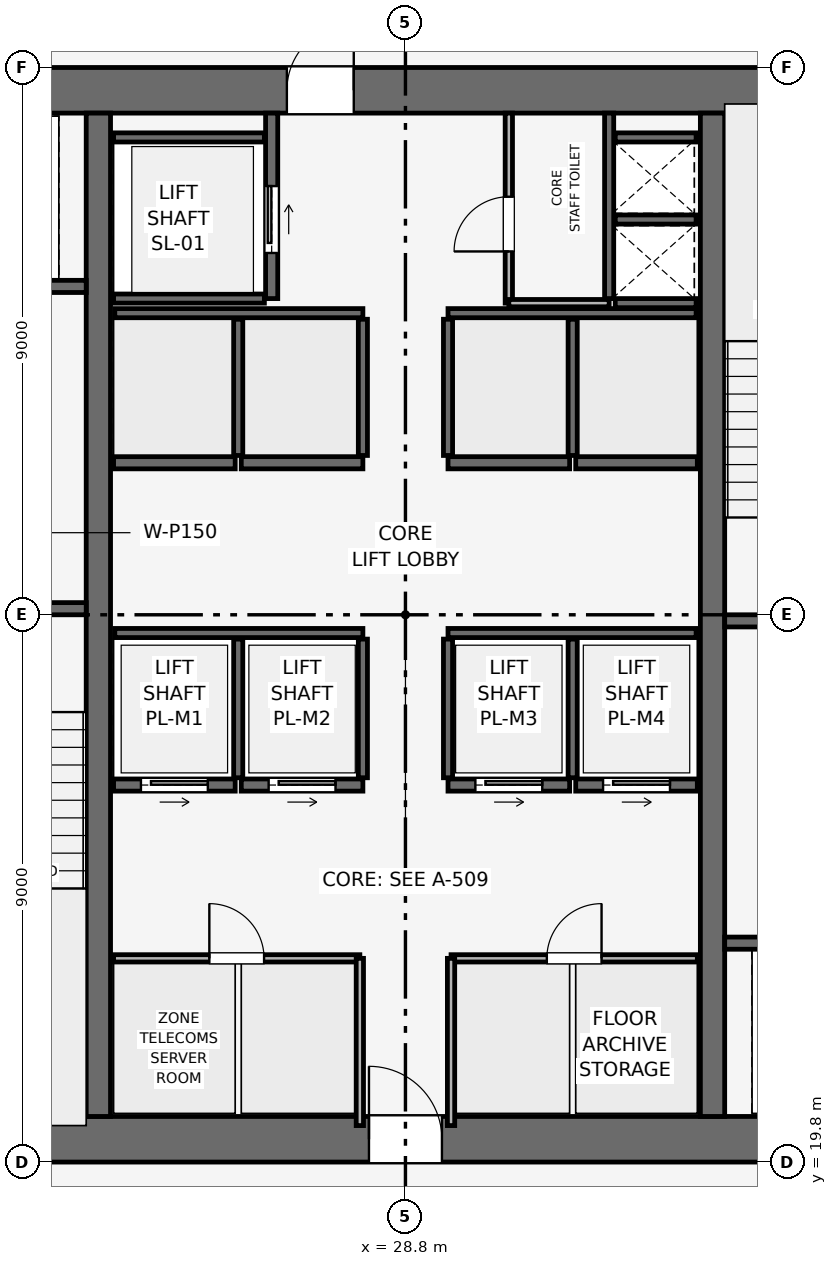
"""IFC4 building model, lengths in metres.
Left out: names, types, materials, properties, quantities, classifications, styles, units other than length and angle.
Written with IfcOpenShell. Run it as: python <this file> out.ifc"""

import sys

from ifc_helpers import new_model, si_unit, direction, frame, frame_2d, origin, place, context, subcontext, project, spatial, rectangle, extrude, element, fill, save


model = new_model("IFC4")
c1 = context("Model", 3, precision=1e-05, world=origin(), true_north=direction((0.0, 1.0)))
c2 = subcontext(c1, "Body", "Model", "MODEL_VIEW")
j1 = project(units=[si_unit("LENGTHUNIT", "METRE"), si_unit("PLANEANGLEUNIT", "RADIAN")], contexts=[c1])
p1 = place(None, origin())
s1 = spatial("IfcSite", under=j1, at=p1, CompositionType="ELEMENT")
p2 = place(p1, origin())
s2 = spatial("IfcBuilding", under=s1, at=p2, CompositionType="ELEMENT")
p3 = place(p2, frame((0.0, 0.0, 229.95)))
s3 = spatial("IfcBuildingStorey", under=s2, at=p3, CompositionType="ELEMENT", Elevation=229.95)
p4 = place(p3, frame((19.8, 20.175, 0.0), z_axis=(0.0, 0.0, 1.0), x_axis=(1.0, 0.0, 0.0)))
e1 = element("IfcWall", 1, at=p4, inside=s3, PredefinedType="SHEAR", context=c2, shape_type="SweptSolid", body=[
    extrude(rectangle(XDim=18.0, YDim=0.75, at=frame_2d((9.0, 0.0))), origin(), (0.0, 0.0, 1.0), 3.75),
])
p5 = place(p4, frame((8.4, 0.0, 0.0)))
e2 = element("IfcOpeningElement", 2, at=p5, cuts=e1, PredefinedType="OPENING", context=c2, shape_type="SweptSolid", body=[
    extrude(rectangle(XDim=1.2, YDim=2.2, at=frame_2d((0.6, 1.1))), frame((0.0, 0.385, 0.0), z_axis=(0.0, -1.0, 0.0), x_axis=(1.0, 0.0, 0.0)), (0.0, 0.0, 1.0), 0.77),
])
p6 = place(p3, frame((19.8, 37.425, 0.0), z_axis=(0.0, 0.0, 1.0), x_axis=(1.0, 0.0, 0.0)))
e3 = element("IfcWall", 3, at=p6, inside=s3, PredefinedType="SHEAR", context=c2, shape_type="SweptSolid", body=[
    extrude(rectangle(XDim=18.0, YDim=0.75, at=frame_2d((9.0, 0.0))), origin(), (0.0, 0.0, 1.0), 3.75),
])
p7 = place(p6, frame((7.05, 0.0, 0.0)))
e4 = element("IfcOpeningElement", 4, at=p7, cuts=e3, PredefinedType="OPENING", context=c2, shape_type="SweptSolid", body=[
    extrude(rectangle(XDim=1.1, YDim=2.15, at=frame_2d((0.55, 1.075))), frame((0.0, 0.385, 0.0), z_axis=(0.0, -1.0, 0.0), x_axis=(1.0, 0.0, 0.0)), (0.0, 0.0, 1.0), 0.77),
])
for number, where, z_axis, x_axis in (
    (5, (23.75, 20.55, 0.0), (0.0, 0.0, 1.0), (0.0, 1.0, 0.0)),
    (6, (33.85, 20.55, 0.0), (0.0, 0.0, 1.0), (0.0, 1.0, 0.0)),
):
    element("IfcWall", number, at=place(p3, frame(where, z_axis=z_axis, x_axis=x_axis)), inside=s3, PredefinedType="SHEAR", context=c2, shape_type="SweptSolid", body=[
        extrude(rectangle(XDim=16.5, YDim=0.4, at=frame_2d((8.25, 0.0))), origin(), (0.0, 0.0, 1.0), 3.75),
    ])
p8 = place(p3, frame((20.4, 28.9, 0.0), z_axis=(0.0, 0.0, 1.0), x_axis=(1.0, 0.0, 0.0)))
e7 = element("IfcWall", 7, at=p8, inside=s3, PredefinedType="SHEAR", context=c2, shape_type="SweptSolid", body=[
    extrude(rectangle(XDim=3.15, YDim=0.2, at=frame_2d((1.575, 0.0))), origin(), (0.0, 0.0, 1.0), 3.5),
])
p9 = place(p8, frame((0.8, 0.0, 0.0)))
e8 = element("IfcOpeningElement", 8, at=p9, cuts=e7, PredefinedType="OPENING", context=c2, shape_type="SweptSolid", body=[
    extrude(rectangle(XDim=1.0, YDim=2.1, at=frame_2d((0.5, 1.05))), frame((0.0, 0.11, 0.0), z_axis=(0.0, -1.0, 0.0), x_axis=(1.0, 0.0, 0.0)), (0.0, 0.0, 1.0), 0.22),
])
p10 = place(p3, frame((34.05, 28.7, 0.0), z_axis=(0.0, 0.0, 1.0), x_axis=(1.0, 0.0, 0.0)))
e9 = element("IfcWall", 9, at=p10, inside=s3, PredefinedType="SHEAR", context=c2, shape_type="SweptSolid", body=[
    extrude(rectangle(XDim=3.15, YDim=0.2, at=frame_2d((1.575, 0.0))), origin(), (0.0, 0.0, 1.0), 3.5),
])
p11 = place(p10, frame((0.8, 0.0, 0.0)))
e10 = element("IfcOpeningElement", 10, at=p11, cuts=e9, PredefinedType="OPENING", context=c2, shape_type="SweptSolid", body=[
    extrude(rectangle(XDim=1.0, YDim=2.1, at=frame_2d((0.5, 1.05))), frame((0.0, 0.11, 0.0), z_axis=(0.0, -1.0, 0.0), x_axis=(1.0, 0.0, 0.0)), (0.0, 0.0, 1.0), 0.22),
])
p12 = place(p3, frame((32.15, 34.0, 0.0), z_axis=(0.0, 0.0, 1.0), x_axis=(0.0, 1.0, 0.0)))
e11 = element("IfcWall", 11, at=p12, inside=s3, PredefinedType="SHEAR", context=c2, shape_type="SweptSolid", body=[
    extrude(rectangle(XDim=3.05, YDim=0.15, at=frame_2d((1.525, 0.0))), origin(), (0.0, 0.0, 1.0), 3.5),
])
for number, where, z_axis, x_axis in (
    (12, (32.25, 33.925, 0.0), (0.0, 0.0, 1.0), (1.0, 0.0, 0.0)),
    (13, (32.25, 35.3, 0.0), (0.0, 0.0, 1.0), (1.0, 0.0, 0.0)),
):
    element("IfcWall", number, at=place(p3, frame(where, z_axis=z_axis, x_axis=x_axis)), inside=s3, PredefinedType="SHEAR", context=c2, shape_type="SweptSolid", body=[
        extrude(rectangle(XDim=1.33, YDim=0.15, at=frame_2d((0.665, 0.0))), origin(), (0.0, 0.0, 1.0), 3.5),
    ])
p13 = place(p3, frame((20.5, 34.2, 0.0), z_axis=(0.0, 0.0, 1.0), x_axis=(1.0, 0.0, 0.0)))
e14 = element("IfcWall", 14, at=p13, inside=s3, PredefinedType="SHEAR", context=c2, shape_type="SweptSolid", body=[
    extrude(rectangle(XDim=3.05, YDim=0.2, at=frame_2d((1.525, 0.0))), origin(), (0.0, 0.0, 1.0), 3.5),
])
p14 = place(p13, frame((0.75, 0.0, 0.0)))
e15 = element("IfcOpeningElement", 15, at=p14, cuts=e14, PredefinedType="OPENING", context=c2, shape_type="SweptSolid", body=[
    extrude(rectangle(XDim=1.1, YDim=2.15, at=frame_2d((0.55, 1.075))), frame((0.0, 0.11, 0.0), z_axis=(0.0, -1.0, 0.0), x_axis=(1.0, 0.0, 0.0)), (0.0, 0.0, 1.0), 0.22),
])
p15 = place(p3, frame((34.05, 23.4, 0.0), z_axis=(0.0, 0.0, 1.0), x_axis=(1.0, 0.0, 0.0)))
e16 = element("IfcWall", 16, at=p15, inside=s3, PredefinedType="SHEAR", context=c2, shape_type="SweptSolid", body=[
    extrude(rectangle(XDim=3.05, YDim=0.2, at=frame_2d((1.525, 0.0))), origin(), (0.0, 0.0, 1.0), 3.5),
])
p16 = place(p15, frame((1.2, 0.0, 0.0)))
e17 = element("IfcOpeningElement", 17, at=p16, cuts=e16, PredefinedType="OPENING", context=c2, shape_type="SweptSolid", body=[
    extrude(rectangle(XDim=1.1, YDim=2.15, at=frame_2d((0.55, 1.075))), frame((0.0, 0.11, 0.0), z_axis=(0.0, -1.0, 0.0), x_axis=(1.0, 0.0, 0.0)), (0.0, 0.0, 1.0), 0.22),
])
p17 = place(p3, frame((26.6, 34.0, 0.0), z_axis=(0.0, 0.0, 1.0), x_axis=(0.0, 1.0, 0.0)))
e18 = element("IfcWall", 18, at=p17, inside=s3, PredefinedType="SHEAR", context=c2, shape_type="SweptSolid", body=[
    extrude(rectangle(XDim=3.05, YDim=0.2, at=frame_2d((1.525, 0.0))), origin(), (0.0, 0.0, 1.0), 3.5),
])
p18 = place(p17, frame((0.75, 0.0, 0.0)))
e19 = element("IfcOpeningElement", 19, at=p18, cuts=e18, PredefinedType="OPENING", context=c2, shape_type="SweptSolid", body=[
    extrude(rectangle(XDim=1.1, YDim=2.15, at=frame_2d((0.55, 1.075))), frame((0.0, 0.11, 0.0), z_axis=(0.0, -1.0, 0.0), x_axis=(1.0, 0.0, 0.0)), (0.0, 0.0, 1.0), 0.22),
])
for number, where, z_axis, x_axis in (
    (20, (24.0, 34.0, 0.0), (0.0, 0.0, 1.0), (1.0, 0.0, 0.0)),
    (21, (24.0, 36.65, 0.0), (0.0, 0.0, 1.0), (1.0, 0.0, 0.0)),
):
    element("IfcWall", number, at=place(p3, frame(where, z_axis=z_axis, x_axis=x_axis)), inside=s3, PredefinedType="SHEAR", context=c2, shape_type="SweptSolid", body=[
        extrude(rectangle(XDim=2.48, YDim=0.15, at=frame_2d((1.24, 0.0))), origin(), (0.0, 0.0, 1.0), 3.5),
    ])
p19 = place(p3, frame((24.0, 26.0, 0.0), z_axis=(0.0, 0.0, 1.0), x_axis=(1.0, 0.0, 0.0)))
e22 = element("IfcWall", 22, at=p19, inside=s3, PredefinedType="SHEAR", context=c2, shape_type="SweptSolid", body=[
    extrude(rectangle(XDim=2.0, YDim=0.2, at=frame_2d((1.0, 0.0))), origin(), (0.0, 0.0, 1.0), 3.5),
])
p20 = place(p19, frame((0.45, 0.0, 0.0)))
e23 = element("IfcOpeningElement", 23, at=p20, cuts=e22, PredefinedType="OPENING", context=c2, shape_type="SweptSolid", body=[
    extrude(rectangle(XDim=1.1, YDim=2.15, at=frame_2d((0.55, 1.075))), frame((0.0, 0.11, 0.0), z_axis=(0.0, -1.0, 0.0), x_axis=(1.0, 0.0, 0.0)), (0.0, 0.0, 1.0), 0.22),
])
p21 = place(p3, frame((26.1, 26.0, 0.0), z_axis=(0.0, 0.0, 1.0), x_axis=(1.0, 0.0, 0.0)))
e24 = element("IfcWall", 24, at=p21, inside=s3, PredefinedType="SHEAR", context=c2, shape_type="SweptSolid", body=[
    extrude(rectangle(XDim=2.0, YDim=0.2, at=frame_2d((1.0, 0.0))), origin(), (0.0, 0.0, 1.0), 3.5),
])
p22 = place(p21, frame((0.45, 0.0, 0.0)))
e25 = element("IfcOpeningElement", 25, at=p22, cuts=e24, PredefinedType="OPENING", context=c2, shape_type="SweptSolid", body=[
    extrude(rectangle(XDim=1.1, YDim=2.15, at=frame_2d((0.55, 1.075))), frame((0.0, 0.11, 0.0), z_axis=(0.0, -1.0, 0.0), x_axis=(1.0, 0.0, 0.0)), (0.0, 0.0, 1.0), 0.22),
])
p23 = place(p3, frame((29.5, 26.0, 0.0), z_axis=(0.0, 0.0, 1.0), x_axis=(1.0, 0.0, 0.0)))
e26 = element("IfcWall", 26, at=p23, inside=s3, PredefinedType="SHEAR", context=c2, shape_type="SweptSolid", body=[
    extrude(rectangle(XDim=2.0, YDim=0.2, at=frame_2d((1.0, 0.0))), origin(), (0.0, 0.0, 1.0), 3.5),
])
p24 = place(p23, frame((0.45, 0.0, 0.0)))
e27 = element("IfcOpeningElement", 27, at=p24, cuts=e26, PredefinedType="OPENING", context=c2, shape_type="SweptSolid", body=[
    extrude(rectangle(XDim=1.1, YDim=2.15, at=frame_2d((0.55, 1.075))), frame((0.0, 0.11, 0.0), z_axis=(0.0, -1.0, 0.0), x_axis=(1.0, 0.0, 0.0)), (0.0, 0.0, 1.0), 0.22),
])
p25 = place(p3, frame((31.6, 26.0, 0.0), z_axis=(0.0, 0.0, 1.0), x_axis=(1.0, 0.0, 0.0)))
e28 = element("IfcWall", 28, at=p25, inside=s3, PredefinedType="SHEAR", context=c2, shape_type="SweptSolid", body=[
    extrude(rectangle(XDim=2.0, YDim=0.2, at=frame_2d((1.0, 0.0))), origin(), (0.0, 0.0, 1.0), 3.5),
])
p26 = place(p25, frame((0.45, 0.0, 0.0)))
e29 = element("IfcOpeningElement", 29, at=p26, cuts=e28, PredefinedType="OPENING", context=c2, shape_type="SweptSolid", body=[
    extrude(rectangle(XDim=1.1, YDim=2.15, at=frame_2d((0.55, 1.075))), frame((0.0, 0.11, 0.0), z_axis=(0.0, -1.0, 0.0), x_axis=(1.0, 0.0, 0.0)), (0.0, 0.0, 1.0), 0.22),
])
for number, where, z_axis, x_axis in (
    (30, (24.0, 31.3, 0.0), (0.0, 0.0, 1.0), (1.0, 0.0, 0.0)),
    (31, (26.1, 31.3, 0.0), (0.0, 0.0, 1.0), (1.0, 0.0, 0.0)),
    (32, (29.5, 31.3, 0.0), (0.0, 0.0, 1.0), (1.0, 0.0, 0.0)),
    (33, (31.6, 31.3, 0.0), (0.0, 0.0, 1.0), (1.0, 0.0, 0.0)),
):
    element("IfcWall", number, at=place(p3, frame(where, z_axis=z_axis, x_axis=x_axis)), inside=s3, PredefinedType="SHEAR", context=c2, shape_type="SweptSolid", body=[
        extrude(rectangle(XDim=2.0, YDim=0.2, at=frame_2d((1.0, 0.0))), origin(), (0.0, 0.0, 1.0), 3.5),
    ])
p27 = place(p3, frame((32.25, 36.65, 0.0), z_axis=(0.0, 0.0, 1.0), x_axis=(1.0, 0.0, 0.0)))
e34 = element("IfcWall", 34, at=p27, inside=s3, PredefinedType="SHEAR", context=c2, shape_type="SweptSolid", body=[
    extrude(rectangle(XDim=1.33, YDim=0.15, at=frame_2d((0.665, 0.0))), origin(), (0.0, 0.0, 1.0), 3.5),
])
for number, where, z_axis, x_axis in (
    (35, (24.02, 28.5, 0.0), (0.0, 0.0, 1.0), (1.0, 0.0, 0.0)),
    (36, (29.5, 28.5, 0.0), (0.0, 0.0, 1.0), (1.0, 0.0, 0.0)),
):
    element("IfcWall", number, at=place(p3, frame(where, z_axis=z_axis, x_axis=x_axis)), inside=s3, PredefinedType="SHEAR", context=c2, shape_type="SweptSolid", body=[
        extrude(rectangle(XDim=4.08, YDim=0.15, at=frame_2d((2.04, 0.0))), origin(), (0.0, 0.0, 1.0), 3.5),
    ])
for number, where, z_axis, x_axis in (
    (37, (26.05, 26.12, 0.0), (0.0, 0.0, 1.0), (0.0, 1.0, 0.0)),
    (38, (28.1, 26.12, 0.0), (0.0, 0.0, 1.0), (0.0, 1.0, 0.0)),
    (39, (29.5, 26.12, 0.0), (0.0, 0.0, 1.0), (0.0, 1.0, 0.0)),
    (40, (31.55, 26.12, 0.0), (0.0, 0.0, 1.0), (0.0, 1.0, 0.0)),
):
    element("IfcWall", number, at=place(p3, frame(where, z_axis=z_axis, x_axis=x_axis)), inside=s3, PredefinedType="SHEAR", context=c2, shape_type="SweptSolid", body=[
        extrude(rectangle(XDim=2.28, YDim=0.15, at=frame_2d((1.14, 0.0))), origin(), (0.0, 0.0, 1.0), 3.5),
    ])
for number, where, z_axis, x_axis in (
    (41, (24.02, 33.76, 0.0), (0.0, 0.0, 1.0), (1.0, 0.0, 0.0)),
    (42, (29.5, 33.76, 0.0), (0.0, 0.0, 1.0), (1.0, 0.0, 0.0)),
):
    element("IfcWall", number, at=place(p3, frame(where, z_axis=z_axis, x_axis=x_axis)), inside=s3, PredefinedType="SHEAR", context=c2, shape_type="SweptSolid", body=[
        extrude(rectangle(XDim=4.08, YDim=0.15, at=frame_2d((2.04, 0.0))), origin(), (0.0, 0.0, 1.0), 3.5),
    ])
for number, where, z_axis, x_axis in (
    (43, (26.05, 31.42, 0.0), (0.0, 0.0, 1.0), (0.0, 1.0, 0.0)),
    (44, (28.1, 31.42, 0.0), (0.0, 0.0, 1.0), (0.0, 1.0, 0.0)),
    (45, (29.5, 31.42, 0.0), (0.0, 0.0, 1.0), (0.0, 1.0, 0.0)),
    (46, (31.55, 31.42, 0.0), (0.0, 0.0, 1.0), (0.0, 1.0, 0.0)),
):
    element("IfcWall", number, at=place(p3, frame(where, z_axis=z_axis, x_axis=x_axis)), inside=s3, PredefinedType="SHEAR", context=c2, shape_type="SweptSolid", body=[
        extrude(rectangle(XDim=2.24, YDim=0.15, at=frame_2d((1.12, 0.0))), origin(), (0.0, 0.0, 1.0), 3.5),
    ])
p28 = place(p3, frame((30.5, 33.925, 0.0), z_axis=(0.0, 0.0, 1.0), x_axis=(0.0, 1.0, 0.0)))
e47 = element("IfcWall", 47, at=p28, inside=s3, PredefinedType="PARTITIONING", context=c2, shape_type="SweptSolid", body=[
    extrude(rectangle(XDim=3.125, YDim=0.12, at=frame_2d((1.562, 0.0))), origin(), (0.0, 0.0, 1.0), 3.5),
])
p29 = place(p28, frame((0.85, 0.0, 0.0)))
e48 = element("IfcOpeningElement", 48, at=p29, cuts=e47, PredefinedType="OPENING", context=c2, shape_type="SweptSolid", body=[
    extrude(rectangle(XDim=0.9, YDim=2.1, at=frame_2d((0.45, 1.05))), frame((0.0, 0.07, 0.0), z_axis=(0.0, -1.0, 0.0), x_axis=(1.0, 0.0, 0.0)), (0.0, 0.0, 1.0), 0.14),
])
p30 = place(p3, frame((30.5, 33.925, 0.0), z_axis=(0.0, 0.0, 1.0), x_axis=(1.0, 0.0, 0.0)))
e49 = element("IfcWall", 49, at=p30, inside=s3, PredefinedType="PARTITIONING", context=c2, shape_type="SweptSolid", body=[
    extrude(rectangle(XDim=1.65, YDim=0.12, at=frame_2d((0.825, 0.0))), origin(), (0.0, 0.0, 1.0), 3.5),
])
p31 = place(p3, frame((24.0, 23.15, 0.0), z_axis=(0.0, 0.0, 1.0), x_axis=(1.0, 0.0, 0.0)))
e50 = element("IfcWall", 50, at=p31, inside=s3, PredefinedType="PARTITIONING", context=c2, shape_type="SweptSolid", body=[
    extrude(rectangle(XDim=4.05, YDim=0.12, at=frame_2d((2.025, 0.0))), origin(), (0.0, 0.0, 1.0), 3.5),
])
p32 = place(p31, frame((1.575, 0.0, 0.0)))
e51 = element("IfcOpeningElement", 51, at=p32, cuts=e50, PredefinedType="OPENING", context=c2, shape_type="SweptSolid", body=[
    extrude(rectangle(XDim=0.9, YDim=2.1, at=frame_2d((0.45, 1.05))), frame((0.0, 0.07, 0.0), z_axis=(0.0, -1.0, 0.0), x_axis=(1.0, 0.0, 0.0)), (0.0, 0.0, 1.0), 0.14),
])
p33 = place(p3, frame((28.05, 20.4, 0.0), z_axis=(0.0, 0.0, 1.0), x_axis=(0.0, 1.0, 0.0)))
e52 = element("IfcWall", 52, at=p33, inside=s3, PredefinedType="PARTITIONING", context=c2, shape_type="SweptSolid", body=[
    extrude(rectangle(XDim=2.75, YDim=0.12, at=frame_2d((1.375, 0.0))), origin(), (0.0, 0.0, 1.0), 3.5),
])
p34 = place(p3, frame((29.55, 23.15, 0.0), z_axis=(0.0, 0.0, 1.0), x_axis=(1.0, 0.0, 0.0)))
e53 = element("IfcWall", 53, at=p34, inside=s3, PredefinedType="PARTITIONING", context=c2, shape_type="SweptSolid", body=[
    extrude(rectangle(XDim=4.05, YDim=0.12, at=frame_2d((2.025, 0.0))), origin(), (0.0, 0.0, 1.0), 3.5),
])
p35 = place(p34, frame((1.575, 0.0, 0.0)))
e54 = element("IfcOpeningElement", 54, at=p35, cuts=e53, PredefinedType="OPENING", context=c2, shape_type="SweptSolid", body=[
    extrude(rectangle(XDim=0.9, YDim=2.1, at=frame_2d((0.45, 1.05))), frame((0.0, 0.07, 0.0), z_axis=(0.0, -1.0, 0.0), x_axis=(1.0, 0.0, 0.0)), (0.0, 0.0, 1.0), 0.14),
])
p36 = place(p3, frame((29.55, 20.4, 0.0), z_axis=(0.0, 0.0, 1.0), x_axis=(0.0, 1.0, 0.0)))
e55 = element("IfcWall", 55, at=p36, inside=s3, PredefinedType="PARTITIONING", context=c2, shape_type="SweptSolid", body=[
    extrude(rectangle(XDim=2.75, YDim=0.12, at=frame_2d((1.375, 0.0))), origin(), (0.0, 0.0, 1.0), 3.5),
])
p37 = place(p18, origin())
e56 = element("IfcDoor", 56, at=p37, inside=s3, OperationType="SLIDING_TO_RIGHT", PredefinedType="DOOR", context=c2, shape_type="SweptSolid", body=[
    extrude(rectangle(XDim=1.1, YDim=2.15, at=frame_2d((0.55, 1.075))), frame((0.0, 0.025, 0.0), z_axis=(0.0, -1.0, 0.0), x_axis=(1.0, 0.0, 0.0)), (0.0, 0.0, 1.0), 0.05),
])
fill(e19, e56)
p38 = place(p20, origin())
e57 = element("IfcDoor", 57, at=p38, inside=s3, OperationType="SLIDING_TO_RIGHT", PredefinedType="DOOR", context=c2, shape_type="SweptSolid", body=[
    extrude(rectangle(XDim=1.1, YDim=2.15, at=frame_2d((0.55, 1.075))), frame((0.0, 0.025, 0.0), z_axis=(0.0, -1.0, 0.0), x_axis=(1.0, 0.0, 0.0)), (0.0, 0.0, 1.0), 0.05),
])
fill(e23, e57)
p39 = place(p22, origin())
e58 = element("IfcDoor", 58, at=p39, inside=s3, OperationType="SLIDING_TO_RIGHT", PredefinedType="DOOR", context=c2, shape_type="SweptSolid", body=[
    extrude(rectangle(XDim=1.1, YDim=2.15, at=frame_2d((0.55, 1.075))), frame((0.0, 0.025, 0.0), z_axis=(0.0, -1.0, 0.0), x_axis=(1.0, 0.0, 0.0)), (0.0, 0.0, 1.0), 0.05),
])
fill(e25, e58)
p40 = place(p24, origin())
e59 = element("IfcDoor", 59, at=p40, inside=s3, OperationType="SLIDING_TO_RIGHT", PredefinedType="DOOR", context=c2, shape_type="SweptSolid", body=[
    extrude(rectangle(XDim=1.1, YDim=2.15, at=frame_2d((0.55, 1.075))), frame((0.0, 0.025, 0.0), z_axis=(0.0, -1.0, 0.0), x_axis=(1.0, 0.0, 0.0)), (0.0, 0.0, 1.0), 0.05),
])
fill(e27, e59)
p41 = place(p26, origin())
e60 = element("IfcDoor", 60, at=p41, inside=s3, OperationType="SLIDING_TO_RIGHT", PredefinedType="DOOR", context=c2, shape_type="SweptSolid", body=[
    extrude(rectangle(XDim=1.1, YDim=2.15, at=frame_2d((0.55, 1.075))), frame((0.0, 0.025, 0.0), z_axis=(0.0, -1.0, 0.0), x_axis=(1.0, 0.0, 0.0)), (0.0, 0.0, 1.0), 0.05),
])
fill(e29, e60)
p42 = place(p29, origin())
e61 = element("IfcDoor", 61, at=p42, inside=s3, OperationType="SINGLE_SWING_LEFT", PredefinedType="DOOR", context=c2, shape_type="SweptSolid", body=[
    extrude(rectangle(XDim=0.9, YDim=2.1, at=frame_2d((0.45, 1.05))), frame((0.0, 0.025, 0.0), z_axis=(0.0, -1.0, 0.0), x_axis=(1.0, 0.0, 0.0)), (0.0, 0.0, 1.0), 0.05),
])
fill(e48, e61)
p43 = place(p32, origin())
e62 = element("IfcDoor", 62, at=p43, inside=s3, OperationType="SINGLE_SWING_LEFT", PredefinedType="DOOR", context=c2, shape_type="SweptSolid", body=[
    extrude(rectangle(XDim=0.9, YDim=2.1, at=frame_2d((0.45, 1.05))), frame((0.0, 0.025, 0.0), z_axis=(0.0, -1.0, 0.0), x_axis=(1.0, 0.0, 0.0)), (0.0, 0.0, 1.0), 0.05),
])
fill(e51, e62)
p44 = place(p35, origin())
e63 = element("IfcDoor", 63, at=p44, inside=s3, OperationType="SINGLE_SWING_RIGHT", PredefinedType="DOOR", context=c2, shape_type="SweptSolid", body=[
    extrude(rectangle(XDim=0.9, YDim=2.1, at=frame_2d((0.45, 1.05))), frame((0.0, 0.025, 0.0), z_axis=(0.0, -1.0, 0.0), x_axis=(1.0, 0.0, 0.0)), (0.0, 0.0, 1.0), 0.05),
])
fill(e54, e63)
p45 = place(p5, origin())
e64 = element("IfcDoor", 64, at=p45, inside=s3, OperationType="SINGLE_SWING_LEFT", PredefinedType="DOOR", context=c2, shape_type="SweptSolid", body=[
    extrude(rectangle(XDim=1.2, YDim=2.2, at=frame_2d((0.6, 1.1))), frame((0.0, 0.025, 0.0), z_axis=(0.0, -1.0, 0.0), x_axis=(1.0, 0.0, 0.0)), (0.0, 0.0, 1.0), 0.05),
])
fill(e2, e64)
p46 = place(p7, origin())
e65 = element("IfcDoor", 65, at=p46, inside=s3, OperationType="SINGLE_SWING_RIGHT", PredefinedType="DOOR", context=c2, shape_type="SweptSolid", body=[
    extrude(rectangle(XDim=1.1, YDim=2.15, at=frame_2d((0.55, 1.075))), frame((0.0, 0.025, 0.0), z_axis=(0.0, -1.0, 0.0), x_axis=(1.0, 0.0, 0.0)), (0.0, 0.0, 1.0), 0.05),
])
fill(e4, e65)
save(model, sys.argv[1])
